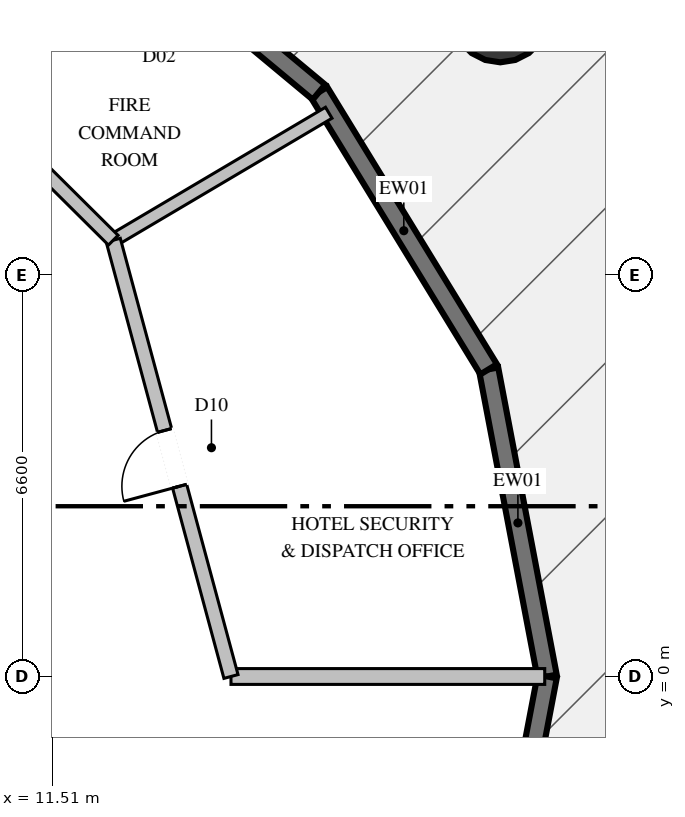
"""IFC4 building model, lengths in metres.
Left out: names, types, materials, properties, quantities, classifications, styles, units other than length and angle.
Written with IfcOpenShell. Run it as: python <this file> out.ifc"""

import sys

from ifc_helpers import new_model, si_unit, direction, frame, frame_2d, origin, origin_2d, place, context, subcontext, project, spatial, rectangle, circle, extrude, element, fill, save


model = new_model("IFC4")
c1 = context("Model", 3, precision=1e-05, world=origin(), true_north=direction((0.0, 1.0)))
c2 = subcontext(c1, "Body", "Model", "MODEL_VIEW")
j1 = project(units=[si_unit("LENGTHUNIT", "METRE"), si_unit("PLANEANGLEUNIT", "RADIAN")], contexts=[c1])
p1 = place(None, origin())
s1 = spatial("IfcSite", under=j1, at=p1, CompositionType="ELEMENT")
p2 = place(p1, origin())
s2 = spatial("IfcBuilding", under=s1, at=p2, CompositionType="ELEMENT")
p3 = place(p2, origin())
s3 = spatial("IfcBuildingStorey", under=s2, at=p3, CompositionType="ELEMENT", Elevation=0.0)
p4 = place(p3, frame((18.879, 10.9, 0.0), z_axis=(0.0, 0.0, 1.0), x_axis=(1.0, 0.0, 0.0)))
e1 = element("IfcColumn", 1, at=p4, inside=s3, PredefinedType="COLUMN", context=c2, shape_type="SweptSolid", body=[
    extrude(circle(Radius=0.8, at=origin_2d()), origin(), (0.0, 0.0, 1.0), 7.2),
])
p5 = place(p3, frame((18.688, 5.052, 0.0), z_axis=(0.0, 0.0, 1.0), x_axis=(0.187042300785, -0.982351860444, 0.0)))
e2 = element("IfcWall", 2, at=p5, inside=s3, PredefinedType="SOLIDWALL", context=c2, shape_type="SweptSolid", body=[
    extrude(rectangle(XDim=5.143, YDim=0.32, at=frame_2d((2.571, 0.0))), origin(), (0.0, 0.0, 1.0), 6.84),
])
p6 = place(p3, frame((15.897, 9.61, 0.0), z_axis=(0.0, 0.0, 1.0), x_axis=(0.522199966643, -0.852823073585, 0.0)))
e3 = element("IfcWall", 3, at=p6, inside=s3, PredefinedType="SOLIDWALL", context=c2, shape_type="SweptSolid", body=[
    extrude(rectangle(XDim=5.345, YDim=0.32, at=frame_2d((2.672, 0.0))), origin(), (0.0, 0.0, 1.0), 6.84),
])
p7 = place(p3, frame((11.55, 13.227, 0.0), z_axis=(0.0, 0.0, 1.0), x_axis=(0.768698801906, -0.639610937952, 0.0)))
e4 = element("IfcWall", 4, at=p7, inside=s3, PredefinedType="SOLIDWALL", context=c2, shape_type="SweptSolid", body=[
    extrude(rectangle(XDim=5.655, YDim=0.32, at=frame_2d((2.828, 0.0))), origin(), (0.0, 0.0, 1.0), 6.84),
])
p8 = place(p7, frame((1.928, 0.0, 0.0)))
e5 = element("IfcOpeningElement", 5, at=p8, cuts=e4, PredefinedType="OPENING", context=c2, shape_type="SweptSolid", body=[
    extrude(rectangle(XDim=1.8, YDim=2.4, at=frame_2d((0.9, 1.2))), frame((0.0, 0.17, 0.0), z_axis=(0.0, -1.0, 0.0), x_axis=(1.0, 0.0, 0.0)), (0.0, 0.0, 1.0), 0.34),
])
p9 = place(p3, frame((19.65, 0.0, 0.0), z_axis=(0.0, 0.0, 1.0), x_axis=(-0.187042300785, -0.982351860444, 0.0)))
e6 = element("IfcWall", 6, at=p9, inside=s3, PredefinedType="SOLIDWALL", context=c2, shape_type="SweptSolid", body=[
    extrude(rectangle(XDim=5.143, YDim=0.32, at=frame_2d((2.571, 0.0))), origin(), (0.0, 0.0, 1.0), 6.84),
])
p10 = place(p9, frame((1.671, 0.0, 0.0)))
e7 = element("IfcOpeningElement", 7, at=p10, cuts=e6, PredefinedType="OPENING", context=c2, shape_type="SweptSolid", body=[
    extrude(rectangle(XDim=1.8, YDim=2.4, at=frame_2d((0.9, 1.2))), frame((0.0, 0.17, 0.0), z_axis=(0.0, -1.0, 0.0), x_axis=(1.0, 0.0, 0.0)), (0.0, 0.0, 1.0), 0.34),
])
p11 = place(p3, frame((14.45, 0.0, 0.0), z_axis=(0.0, 0.0, 1.0), x_axis=(1.0, 0.0, 0.0)))
e8 = element("IfcWall", 8, at=p11, inside=s3, PredefinedType="PARTITIONING", context=c2, shape_type="SweptSolid", body=[
    extrude(rectangle(XDim=5.16, YDim=0.26, at=frame_2d((2.58, 0.0))), origin(), (0.0, 0.0, 1.0), 4.625),
])
p12 = place(p3, frame((12.514, 7.175, 0.0), z_axis=(0.0, 0.0, 1.0), x_axis=(0.860750596586, 0.509026925101, 0.0)))
e9 = element("IfcWall", 9, at=p12, inside=s3, PredefinedType="PARTITIONING", context=c2, shape_type="SweptSolid", body=[
    extrude(rectangle(XDim=4.118, YDim=0.21, at=frame_2d((2.059, 0.0))), origin(), (0.0, 0.0, 1.0), 4.625),
])
p13 = place(p3, frame((14.45, 0.0, 0.0), z_axis=(0.0, 0.0, 1.0), x_axis=(-0.260511833978, 0.965470654322, 0.0)))
e10 = element("IfcWall", 10, at=p13, inside=s3, PredefinedType="PARTITIONING", context=c2, shape_type="SweptSolid", body=[
    extrude(rectangle(XDim=7.432, YDim=0.24, at=frame_2d((3.716, 0.0))), origin(), (0.0, 0.0, 1.0), 6.84),
])
p14 = place(p13, frame((3.241, 0.0, 0.0)))
e11 = element("IfcOpeningElement", 11, at=p14, cuts=e10, PredefinedType="OPENING", context=c2, shape_type="SweptSolid", body=[
    extrude(rectangle(XDim=0.95, YDim=2.1, at=frame_2d((0.475, 1.05))), frame((0.0, 0.13, 0.0), z_axis=(0.0, -1.0, 0.0), x_axis=(1.0, 0.0, 0.0)), (0.0, 0.0, 1.0), 0.26),
])
p15 = place(p3, frame((12.514, 7.175, 0.0), z_axis=(0.0, 0.0, 1.0), x_axis=(-0.709575472763, 0.704629440524, 0.0)))
e12 = element("IfcWall", 12, at=p15, inside=s3, PredefinedType="PARTITIONING", context=c2, shape_type="SweptSolid", body=[
    extrude(rectangle(XDim=7.454, YDim=0.225, at=frame_2d((3.727, 0.0))), origin(), (0.0, 0.0, 1.0), 6.84),
])
p16 = place(p15, frame((3.202, 0.0, 0.0)))
e13 = element("IfcOpeningElement", 13, at=p16, cuts=e12, PredefinedType="OPENING", context=c2, shape_type="SweptSolid", body=[
    extrude(rectangle(XDim=1.05, YDim=2.15, at=frame_2d((0.525, 1.075))), frame((0.0, 0.123, 0.0), z_axis=(0.0, -1.0, 0.0), x_axis=(1.0, 0.0, 0.0)), (0.0, 0.0, 1.0), 0.245),
])
p17 = place(p14, origin())
e14 = element("IfcDoor", 14, at=p17, inside=s3, OperationType="SINGLE_SWING_LEFT", PredefinedType="DOOR", context=c2, shape_type="SweptSolid", body=[
    extrude(rectangle(XDim=0.95, YDim=2.1, at=frame_2d((0.475, 1.05))), frame((0.0, 0.025, 0.0), z_axis=(0.0, -1.0, 0.0), x_axis=(1.0, 0.0, 0.0)), (0.0, 0.0, 1.0), 0.05),
])
fill(e11, e14)
save(model, sys.argv[1])
